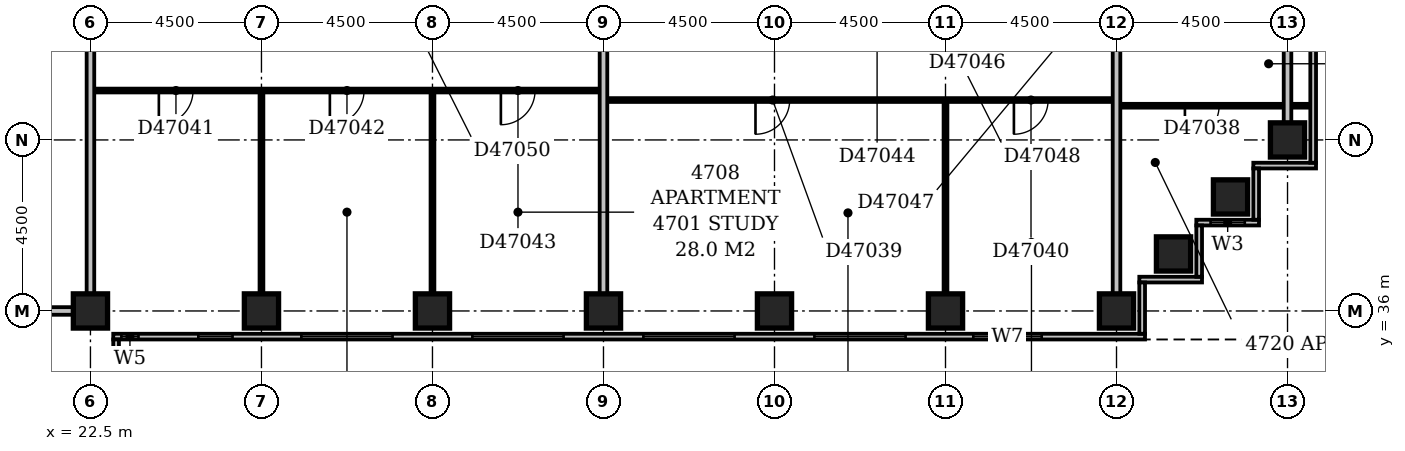
"""IFC4 building model, lengths in metres.
Left out: names, types, materials, properties, quantities, classifications, styles, units other than length and angle.
Written with IfcOpenShell. Run it as: python <this file> out.ifc"""

import sys

from ifc_helpers import new_model, si_unit, direction, frame, frame_2d, origin, origin_2d, place, context, subcontext, project, spatial, rectangle, extrude, element, fill, save


model = new_model("IFC4")
c1 = context("Model", 3, precision=1e-05, world=origin(), true_north=direction((0.0, 1.0)))
c2 = subcontext(c1, "Body", "Model", "MODEL_VIEW")
j1 = project(units=[si_unit("LENGTHUNIT", "METRE"), si_unit("PLANEANGLEUNIT", "RADIAN")], contexts=[c1])
p1 = place(None, origin())
s1 = spatial("IfcSite", under=j1, at=p1, CompositionType="ELEMENT")
p2 = place(p1, origin())
s2 = spatial("IfcBuilding", under=s1, at=p2, CompositionType="ELEMENT")
p3 = place(p2, frame((0.0, 0.0, 186.2)))
s3 = spatial("IfcBuildingStorey", under=s2, at=p3, CompositionType="ELEMENT", Elevation=186.2)
for number, where, z_axis, x_axis in (
    (1, (22.5, 36.0, -0.35), (0.0, 0.0, 1.0), (1.0, 0.0, 0.0)),
    (2, (27.0, 36.0, -0.35), (0.0, 0.0, 1.0), (1.0, 0.0, 0.0)),
    (3, (31.5, 36.0, -0.35), (0.0, 0.0, 1.0), (1.0, 0.0, 0.0)),
    (4, (36.0, 36.0, -0.35), (0.0, 0.0, 1.0), (1.0, 0.0, 0.0)),
    (5, (40.5, 36.0, -0.35), (0.0, 0.0, 1.0), (1.0, 0.0, 0.0)),
    (6, (45.0, 36.0, -0.35), (0.0, 0.0, 1.0), (1.0, 0.0, 0.0)),
    (7, (49.5, 36.0, -0.35), (0.0, 0.0, 1.0), (1.0, 0.0, 0.0)),
    (8, (51.0, 37.5, -0.35), (0.0, 0.0, 1.0), (1.0, 0.0, 0.0)),
    (9, (52.5, 39.0, -0.35), (0.0, 0.0, 1.0), (1.0, 0.0, 0.0)),
    (10, (54.0, 40.5, -0.35), (0.0, 0.0, 1.0), (1.0, 0.0, 0.0)),
):
    element("IfcColumn", number, at=place(p3, frame(where, z_axis=z_axis, x_axis=x_axis)), inside=s3, PredefinedType="COLUMN", context=c2, shape_type="SweptSolid", body=[
        extrude(rectangle(XDim=0.9, YDim=0.9, at=origin_2d()), origin(), (0.0, 0.0, 1.0), 3.65),
    ])
p4 = place(p3, frame((23.175, 17.4, 0.0), z_axis=(0.0, 0.0, 1.0), x_axis=(0.0, 1.0, 0.0)))
e11 = element("IfcWall", 11, at=p4, inside=s3, PredefinedType="STANDARD", context=c2, shape_type="SweptSolid", body=[
    extrude(rectangle(XDim=17.85, YDim=0.15, at=frame_2d((8.925, 0.0))), origin(), (0.0, 0.0, 1.0), 2.7),
])
p5 = place(p4, frame((2.937, 0.0, 0.6)))
e12 = element("IfcOpeningElement", 12, at=p5, cuts=e11, PredefinedType="OPENING", context=c2, shape_type="SweptSolid", body=[
    extrude(rectangle(XDim=1.5, YDim=1.8, at=frame_2d((0.75, 0.9))), frame((0.0, 0.087, 0.0), z_axis=(0.0, -1.0, 0.0), x_axis=(1.0, 0.0, 0.0)), (0.0, 0.0, 1.0), 0.174),
])
p6 = place(p4, frame((6.15, 0.0, 0.6)))
e13 = element("IfcOpeningElement", 13, at=p6, cuts=e11, PredefinedType="OPENING", context=c2, shape_type="SweptSolid", body=[
    extrude(rectangle(XDim=2.4, YDim=1.8, at=frame_2d((1.2, 0.9))), frame((0.0, 0.087, 0.0), z_axis=(0.0, -1.0, 0.0), x_axis=(1.0, 0.0, 0.0)), (0.0, 0.0, 1.0), 0.174),
])
p7 = place(p4, frame((10.65, 0.0, 0.6)))
e14 = element("IfcOpeningElement", 14, at=p7, cuts=e11, PredefinedType="OPENING", context=c2, shape_type="SweptSolid", body=[
    extrude(rectangle(XDim=2.4, YDim=1.8, at=frame_2d((1.2, 0.9))), frame((0.0, 0.087, 0.0), z_axis=(0.0, -1.0, 0.0), x_axis=(1.0, 0.0, 0.0)), (0.0, 0.0, 1.0), 0.174),
])
p8 = place(p4, frame((14.869, 0.0, 0.6)))
e15 = element("IfcOpeningElement", 15, at=p8, cuts=e11, PredefinedType="OPENING", context=c2, shape_type="SweptSolid", body=[
    extrude(rectangle(XDim=2.4, YDim=1.8, at=frame_2d((1.2, 0.9))), frame((0.0, 0.087, 0.0), z_axis=(0.0, -1.0, 0.0), x_axis=(1.0, 0.0, 0.0)), (0.0, 0.0, 1.0), 0.174),
])
p9 = place(p3, frame((23.1, 35.325, 0.0), z_axis=(0.0, 0.0, 1.0), x_axis=(1.0, 0.0, 0.0)))
e16 = element("IfcWall", 16, at=p9, inside=s3, PredefinedType="STANDARD", context=c2, shape_type="SweptSolid", body=[
    extrude(rectangle(XDim=27.15, YDim=0.15, at=frame_2d((13.575, 0.0))), origin(), (0.0, 0.0, 1.0), 2.7),
])
p10 = place(p9, frame((0.214, 0.0, 0.6)))
e17 = element("IfcOpeningElement", 17, at=p10, cuts=e16, PredefinedType="OPENING", context=c2, shape_type="SweptSolid", body=[
    extrude(rectangle(XDim=0.45, YDim=1.8, at=frame_2d((0.225, 0.9))), frame((0.0, 0.087, 0.0), z_axis=(0.0, -1.0, 0.0), x_axis=(1.0, 0.0, 0.0)), (0.0, 0.0, 1.0), 0.174),
])
p11 = place(p9, frame((2.239, 0.0, 0.6)))
e18 = element("IfcOpeningElement", 18, at=p11, cuts=e16, PredefinedType="OPENING", context=c2, shape_type="SweptSolid", body=[
    extrude(rectangle(XDim=0.9, YDim=1.8, at=frame_2d((0.45, 0.9))), frame((0.0, 0.087, 0.0), z_axis=(0.0, -1.0, 0.0), x_axis=(1.0, 0.0, 0.0)), (0.0, 0.0, 1.0), 0.174),
])
p12 = place(p9, frame((4.95, 0.0, 0.6)))
e19 = element("IfcOpeningElement", 19, at=p12, cuts=e16, PredefinedType="OPENING", context=c2, shape_type="SweptSolid", body=[
    extrude(rectangle(XDim=2.4, YDim=1.8, at=frame_2d((1.2, 0.9))), frame((0.0, 0.087, 0.0), z_axis=(0.0, -1.0, 0.0), x_axis=(1.0, 0.0, 0.0)), (0.0, 0.0, 1.0), 0.174),
])
p13 = place(p9, frame((9.45, 0.0, 0.6)))
e20 = element("IfcOpeningElement", 20, at=p13, cuts=e16, PredefinedType="OPENING", context=c2, shape_type="SweptSolid", body=[
    extrude(rectangle(XDim=2.4, YDim=1.8, at=frame_2d((1.2, 0.9))), frame((0.0, 0.087, 0.0), z_axis=(0.0, -1.0, 0.0), x_axis=(1.0, 0.0, 0.0)), (0.0, 0.0, 1.0), 0.174),
])
p14 = place(p9, frame((13.95, 0.0, 0.6)))
e21 = element("IfcOpeningElement", 21, at=p14, cuts=e16, PredefinedType="OPENING", context=c2, shape_type="SweptSolid", body=[
    extrude(rectangle(XDim=2.4, YDim=1.8, at=frame_2d((1.2, 0.9))), frame((0.0, 0.087, 0.0), z_axis=(0.0, -1.0, 0.0), x_axis=(1.0, 0.0, 0.0)), (0.0, 0.0, 1.0), 0.174),
])
p15 = place(p9, frame((18.45, 0.0, 0.6)))
e22 = element("IfcOpeningElement", 22, at=p15, cuts=e16, PredefinedType="OPENING", context=c2, shape_type="SweptSolid", body=[
    extrude(rectangle(XDim=2.4, YDim=1.8, at=frame_2d((1.2, 0.9))), frame((0.0, 0.087, 0.0), z_axis=(0.0, -1.0, 0.0), x_axis=(1.0, 0.0, 0.0)), (0.0, 0.0, 1.0), 0.174),
])
p16 = place(p9, frame((22.631, 0.0, 0.6)))
e23 = element("IfcOpeningElement", 23, at=p16, cuts=e16, PredefinedType="OPENING", context=c2, shape_type="SweptSolid", body=[
    extrude(rectangle(XDim=1.8, YDim=1.8, at=frame_2d((0.9, 0.9))), frame((0.0, 0.087, 0.0), z_axis=(0.0, -1.0, 0.0), x_axis=(1.0, 0.0, 0.0)), (0.0, 0.0, 1.0), 0.174),
])
p17 = place(p3, frame((50.175, 35.4, 0.0), z_axis=(0.0, 0.0, 1.0), x_axis=(0.0, 1.0, 0.0)))
e24 = element("IfcWall", 24, at=p17, inside=s3, PredefinedType="STANDARD", context=c2, shape_type="SweptSolid", body=[
    extrude(rectangle(XDim=1.35, YDim=0.15, at=frame_2d((0.675, 0.0))), origin(), (0.0, 0.0, 1.0), 2.7),
])
p18 = place(p3, frame((50.1, 36.825, 0.0), z_axis=(0.0, 0.0, 1.0), x_axis=(1.0, 0.0, 0.0)))
e25 = element("IfcWall", 25, at=p18, inside=s3, PredefinedType="STANDARD", context=c2, shape_type="SweptSolid", body=[
    extrude(rectangle(XDim=1.65, YDim=0.15, at=frame_2d((0.825, 0.0))), origin(), (0.0, 0.0, 1.0), 2.7),
])
p19 = place(p3, frame((51.675, 36.9, 0.0), z_axis=(0.0, 0.0, 1.0), x_axis=(0.0, 1.0, 0.0)))
e26 = element("IfcWall", 26, at=p19, inside=s3, PredefinedType="STANDARD", context=c2, shape_type="SweptSolid", body=[
    extrude(rectangle(XDim=1.35, YDim=0.15, at=frame_2d((0.675, 0.0))), origin(), (0.0, 0.0, 1.0), 2.7),
])
p20 = place(p3, frame((51.6, 38.325, 0.0), z_axis=(0.0, 0.0, 1.0), x_axis=(1.0, 0.0, 0.0)))
e27 = element("IfcWall", 27, at=p20, inside=s3, PredefinedType="STANDARD", context=c2, shape_type="SweptSolid", body=[
    extrude(rectangle(XDim=1.65, YDim=0.15, at=frame_2d((0.825, 0.0))), origin(), (0.0, 0.0, 1.0), 2.7),
])
p21 = place(p20, frame((0.375, 0.0, 0.5)))
e28 = element("IfcOpeningElement", 28, at=p21, cuts=e27, PredefinedType="OPENING", context=c2, shape_type="SweptSolid", body=[
    extrude(rectangle(XDim=0.9, YDim=1.8, at=frame_2d((0.45, 0.9))), frame((0.0, 0.087, 0.0), z_axis=(0.0, -1.0, 0.0), x_axis=(1.0, 0.0, 0.0)), (0.0, 0.0, 1.0), 0.174),
])
p22 = place(p3, frame((53.175, 38.4, 0.0), z_axis=(0.0, 0.0, 1.0), x_axis=(0.0, 1.0, 0.0)))
e29 = element("IfcWall", 29, at=p22, inside=s3, PredefinedType="STANDARD", context=c2, shape_type="SweptSolid", body=[
    extrude(rectangle(XDim=1.35, YDim=0.15, at=frame_2d((0.675, 0.0))), origin(), (0.0, 0.0, 1.0), 2.7),
])
p23 = place(p3, frame((53.1, 39.825, 0.0), z_axis=(0.0, 0.0, 1.0), x_axis=(1.0, 0.0, 0.0)))
e30 = element("IfcWall", 30, at=p23, inside=s3, PredefinedType="STANDARD", context=c2, shape_type="SweptSolid", body=[
    extrude(rectangle(XDim=1.65, YDim=0.15, at=frame_2d((0.825, 0.0))), origin(), (0.0, 0.0, 1.0), 2.7),
])
p24 = place(p3, frame((54.675, 39.9, 0.0), z_axis=(0.0, 0.0, 1.0), x_axis=(0.0, 1.0, 0.0)))
e31 = element("IfcWall", 31, at=p24, inside=s3, PredefinedType="STANDARD", context=c2, shape_type="SweptSolid", body=[
    extrude(rectangle(XDim=14.85, YDim=0.15, at=frame_2d((7.425, 0.0))), origin(), (0.0, 0.0, 1.0), 2.7),
])
p25 = place(p24, frame((11.25, 0.0, 0.0)))
e32 = element("IfcOpeningElement", 32, at=p25, cuts=e31, PredefinedType="OPENING", context=c2, shape_type="SweptSolid", body=[
    extrude(rectangle(XDim=1.2, YDim=2.4, at=frame_2d((0.6, 1.2))), frame((0.0, 0.087, 0.0), z_axis=(0.0, -1.0, 0.0), x_axis=(1.0, 0.0, 0.0)), (0.0, 0.0, 1.0), 0.174),
])
p26 = place(p3, frame((9.1, 36.0, 0.0), z_axis=(0.0, 0.0, 1.0), x_axis=(1.0, 0.0, 0.0)))
e33 = element("IfcWall", 33, at=p26, inside=s3, PredefinedType="PARTITIONING", context=c2, shape_type="SweptSolid", body=[
    extrude(rectangle(XDim=12.95, YDim=0.2, at=frame_2d((6.475, 0.0))), origin(), (0.0, 0.0, 1.0), 3.3),
])
p27 = place(p3, frame((22.5, 36.45, 0.0), z_axis=(0.0, 0.0, 1.0), x_axis=(0.0, 1.0, 0.0)))
e34 = element("IfcWall", 34, at=p27, inside=s3, PredefinedType="PARTITIONING", context=c2, shape_type="SweptSolid", body=[
    extrude(rectangle(XDim=13.05, YDim=0.2, at=frame_2d((6.525, 0.0))), origin(), (0.0, 0.0, 1.0), 3.3),
])
p28 = place(p3, frame((27.0, 36.45, 0.0), z_axis=(0.0, 0.0, 1.0), x_axis=(0.0, 1.0, 0.0)))
e35 = element("IfcWall", 35, at=p28, inside=s3, PredefinedType="PARTITIONING", context=c2, shape_type="SweptSolid", body=[
    extrude(rectangle(XDim=5.3, YDim=0.1, at=frame_2d((2.65, 0.0))), origin(), (0.0, 0.0, 1.0), 2.4),
])
p29 = place(p3, frame((31.5, 36.45, 0.0), z_axis=(0.0, 0.0, 1.0), x_axis=(0.0, 1.0, 0.0)))
e36 = element("IfcWall", 36, at=p29, inside=s3, PredefinedType="PARTITIONING", context=c2, shape_type="SweptSolid", body=[
    extrude(rectangle(XDim=5.3, YDim=0.1, at=frame_2d((2.65, 0.0))), origin(), (0.0, 0.0, 1.0), 3.3),
])
p30 = place(p3, frame((36.0, 36.45, 0.0), z_axis=(0.0, 0.0, 1.0), x_axis=(0.0, 1.0, 0.0)))
e37 = element("IfcWall", 37, at=p30, inside=s3, PredefinedType="PARTITIONING", context=c2, shape_type="SweptSolid", body=[
    extrude(rectangle(XDim=12.95, YDim=0.2, at=frame_2d((6.475, 0.0))), origin(), (0.0, 0.0, 1.0), 2.4),
])
p31 = place(p3, frame((45.0, 36.45, 0.0), z_axis=(0.0, 0.0, 1.0), x_axis=(0.0, 1.0, 0.0)))
e38 = element("IfcWall", 38, at=p31, inside=s3, PredefinedType="PARTITIONING", context=c2, shape_type="SweptSolid", body=[
    extrude(rectangle(XDim=5.05, YDim=0.1, at=frame_2d((2.525, 0.0))), origin(), (0.0, 0.0, 1.0), 2.6),
])
p32 = place(p3, frame((49.5, 36.45, 0.0), z_axis=(0.0, 0.0, 1.0), x_axis=(0.0, 1.0, 0.0)))
e39 = element("IfcWall", 39, at=p32, inside=s3, PredefinedType="PARTITIONING", context=c2, shape_type="SweptSolid", body=[
    extrude(rectangle(XDim=12.95, YDim=0.2, at=frame_2d((6.475, 0.0))), origin(), (0.0, 0.0, 1.0), 3.3),
])
p33 = place(p3, frame((54.0, 40.95, 0.0), z_axis=(0.0, 0.0, 1.0), x_axis=(0.0, 1.0, 0.0)))
e40 = element("IfcWall", 40, at=p33, inside=s3, PredefinedType="PARTITIONING", context=c2, shape_type="SweptSolid", body=[
    extrude(rectangle(XDim=8.1, YDim=0.2, at=frame_2d((4.05, 0.0))), origin(), (0.0, 0.0, 1.0), 2.7),
])
p34 = place(p3, frame((49.6, 41.4, 0.0), z_axis=(0.0, 0.0, 1.0), x_axis=(1.0, 0.0, 0.0)))
e41 = element("IfcWall", 41, at=p34, inside=s3, PredefinedType="PARTITIONING", context=c2, shape_type="SweptSolid", body=[
    extrude(rectangle(XDim=5.0, YDim=0.1, at=frame_2d((2.5, 0.0))), origin(), (0.0, 0.0, 1.0), 3.3),
])
p35 = place(p34, frame((1.7, 0.0, 0.0)))
e42 = element("IfcOpeningElement", 42, at=p35, cuts=e41, PredefinedType="OPENING", context=c2, shape_type="SweptSolid", body=[
    extrude(rectangle(XDim=0.9, YDim=2.1, at=frame_2d((0.45, 1.05))), frame((0.0, 0.062, 0.0), z_axis=(0.0, -1.0, 0.0), x_axis=(1.0, 0.0, 0.0)), (0.0, 0.0, 1.0), 0.124),
])
p36 = place(p3, frame((36.1, 41.55, 0.0), z_axis=(0.0, 0.0, 1.0), x_axis=(1.0, 0.0, 0.0)))
e43 = element("IfcWall", 43, at=p36, inside=s3, PredefinedType="PARTITIONING", context=c2, shape_type="SweptSolid", body=[
    extrude(rectangle(XDim=13.3, YDim=0.1, at=frame_2d((6.65, 0.0))), origin(), (0.0, 0.0, 1.0), 3.3),
])
p37 = place(p36, frame((3.9, 0.0, 0.0)))
e44 = element("IfcOpeningElement", 44, at=p37, cuts=e43, PredefinedType="OPENING", context=c2, shape_type="SweptSolid", body=[
    extrude(rectangle(XDim=0.9, YDim=2.1, at=frame_2d((0.45, 1.05))), frame((0.0, 0.062, 0.0), z_axis=(0.0, -1.0, 0.0), x_axis=(1.0, 0.0, 0.0)), (0.0, 0.0, 1.0), 0.124),
])
p38 = place(p36, frame((10.7, 0.0, 0.0)))
e45 = element("IfcOpeningElement", 45, at=p38, cuts=e43, PredefinedType="OPENING", context=c2, shape_type="SweptSolid", body=[
    extrude(rectangle(XDim=0.9, YDim=2.1, at=frame_2d((0.45, 1.05))), frame((0.0, 0.062, 0.0), z_axis=(0.0, -1.0, 0.0), x_axis=(1.0, 0.0, 0.0)), (0.0, 0.0, 1.0), 0.124),
])
p39 = place(p3, frame((22.6, 41.8, 0.0), z_axis=(0.0, 0.0, 1.0), x_axis=(1.0, 0.0, 0.0)))
e46 = element("IfcWall", 46, at=p39, inside=s3, PredefinedType="PARTITIONING", context=c2, shape_type="SweptSolid", body=[
    extrude(rectangle(XDim=13.3, YDim=0.1, at=frame_2d((6.65, 0.0))), origin(), (0.0, 0.0, 1.0), 3.3),
])
p40 = place(p39, frame((1.7, 0.0, 0.0)))
e47 = element("IfcOpeningElement", 47, at=p40, cuts=e46, PredefinedType="OPENING", context=c2, shape_type="SweptSolid", body=[
    extrude(rectangle(XDim=0.9, YDim=2.1, at=frame_2d((0.45, 1.05))), frame((0.0, 0.062, 0.0), z_axis=(0.0, -1.0, 0.0), x_axis=(1.0, 0.0, 0.0)), (0.0, 0.0, 1.0), 0.124),
])
p41 = place(p39, frame((6.2, 0.0, 0.0)))
e48 = element("IfcOpeningElement", 48, at=p41, cuts=e46, PredefinedType="OPENING", context=c2, shape_type="SweptSolid", body=[
    extrude(rectangle(XDim=0.9, YDim=2.1, at=frame_2d((0.45, 1.05))), frame((0.0, 0.062, 0.0), z_axis=(0.0, -1.0, 0.0), x_axis=(1.0, 0.0, 0.0)), (0.0, 0.0, 1.0), 0.124),
])
p42 = place(p39, frame((10.7, 0.0, 0.0)))
e49 = element("IfcOpeningElement", 49, at=p42, cuts=e46, PredefinedType="OPENING", context=c2, shape_type="SweptSolid", body=[
    extrude(rectangle(XDim=0.9, YDim=2.1, at=frame_2d((0.45, 1.05))), frame((0.0, 0.062, 0.0), z_axis=(0.0, -1.0, 0.0), x_axis=(1.0, 0.0, 0.0)), (0.0, 0.0, 1.0), 0.124),
])
p43 = place(p8, origin())
e50 = element("IfcWindow", 50, at=p43, inside=s3, PartitioningType="SINGLE_PANEL", PredefinedType="WINDOW", context=c2, shape_type="SweptSolid", body=[
    extrude(rectangle(XDim=2.4, YDim=1.8, at=frame_2d((1.2, 0.9))), frame((0.0, 0.03, 0.0), z_axis=(0.0, -1.0, 0.0), x_axis=(1.0, 0.0, 0.0)), (0.0, 0.0, 1.0), 0.06),
])
fill(e15, e50)
p44 = place(p10, origin())
e51 = element("IfcWindow", 51, at=p44, inside=s3, PartitioningType="SINGLE_PANEL", PredefinedType="WINDOW", context=c2, shape_type="SweptSolid", body=[
    extrude(rectangle(XDim=0.45, YDim=1.8, at=frame_2d((0.225, 0.9))), frame((0.0, 0.03, 0.0), z_axis=(0.0, -1.0, 0.0), x_axis=(1.0, 0.0, 0.0)), (0.0, 0.0, 1.0), 0.06),
])
fill(e17, e51)
p45 = place(p11, origin())
e52 = element("IfcWindow", 52, at=p45, inside=s3, PartitioningType="SINGLE_PANEL", PredefinedType="WINDOW", context=c2, shape_type="SweptSolid", body=[
    extrude(rectangle(XDim=0.9, YDim=1.8, at=frame_2d((0.45, 0.9))), frame((0.0, 0.03, 0.0), z_axis=(0.0, -1.0, 0.0), x_axis=(1.0, 0.0, 0.0)), (0.0, 0.0, 1.0), 0.06),
])
fill(e18, e52)
p46 = place(p12, origin())
e53 = element("IfcWindow", 53, at=p46, inside=s3, PartitioningType="SINGLE_PANEL", PredefinedType="WINDOW", context=c2, shape_type="SweptSolid", body=[
    extrude(rectangle(XDim=2.4, YDim=1.8, at=frame_2d((1.2, 0.9))), frame((0.0, 0.03, 0.0), z_axis=(0.0, -1.0, 0.0), x_axis=(1.0, 0.0, 0.0)), (0.0, 0.0, 1.0), 0.06),
])
fill(e19, e53)
p47 = place(p13, origin())
e54 = element("IfcWindow", 54, at=p47, inside=s3, PartitioningType="SINGLE_PANEL", PredefinedType="WINDOW", context=c2, shape_type="SweptSolid", body=[
    extrude(rectangle(XDim=2.4, YDim=1.8, at=frame_2d((1.2, 0.9))), frame((0.0, 0.03, 0.0), z_axis=(0.0, -1.0, 0.0), x_axis=(1.0, 0.0, 0.0)), (0.0, 0.0, 1.0), 0.06),
])
fill(e20, e54)
p48 = place(p14, origin())
e55 = element("IfcWindow", 55, at=p48, inside=s3, PartitioningType="SINGLE_PANEL", PredefinedType="WINDOW", context=c2, shape_type="SweptSolid", body=[
    extrude(rectangle(XDim=2.4, YDim=1.8, at=frame_2d((1.2, 0.9))), frame((0.0, 0.03, 0.0), z_axis=(0.0, -1.0, 0.0), x_axis=(1.0, 0.0, 0.0)), (0.0, 0.0, 1.0), 0.06),
])
fill(e21, e55)
p49 = place(p15, origin())
e56 = element("IfcWindow", 56, at=p49, inside=s3, PartitioningType="SINGLE_PANEL", PredefinedType="WINDOW", context=c2, shape_type="SweptSolid", body=[
    extrude(rectangle(XDim=2.4, YDim=1.8, at=frame_2d((1.2, 0.9))), frame((0.0, 0.03, 0.0), z_axis=(0.0, -1.0, 0.0), x_axis=(1.0, 0.0, 0.0)), (0.0, 0.0, 1.0), 0.06),
])
fill(e22, e56)
p50 = place(p16, origin())
e57 = element("IfcWindow", 57, at=p50, inside=s3, PartitioningType="SINGLE_PANEL", PredefinedType="WINDOW", context=c2, shape_type="SweptSolid", body=[
    extrude(rectangle(XDim=1.8, YDim=1.8, at=frame_2d((0.9, 0.9))), frame((0.0, 0.03, 0.0), z_axis=(0.0, -1.0, 0.0), x_axis=(1.0, 0.0, 0.0)), (0.0, 0.0, 1.0), 0.06),
])
fill(e23, e57)
p51 = place(p21, origin())
e58 = element("IfcWindow", 58, at=p51, inside=s3, PartitioningType="SINGLE_PANEL", PredefinedType="WINDOW", context=c2, shape_type="SweptSolid", body=[
    extrude(rectangle(XDim=0.9, YDim=1.8, at=frame_2d((0.45, 0.9))), frame((0.0, 0.03, 0.0), z_axis=(0.0, -1.0, 0.0), x_axis=(1.0, 0.0, 0.0)), (0.0, 0.0, 1.0), 0.06),
])
fill(e28, e58)
p52 = place(p35, frame((0.9, 0.0, 0.0), z_axis=(0.0, 0.0, 1.0), x_axis=(-1.0, 0.0, 0.0)))
e59 = element("IfcDoor", 59, at=p52, inside=s3, OperationType="SINGLE_SWING_RIGHT", PredefinedType="DOOR", context=c2, shape_type="SweptSolid", body=[
    extrude(rectangle(XDim=0.9, YDim=2.1, at=frame_2d((0.45, 1.05))), frame((0.0, 0.025, 0.0), z_axis=(0.0, -1.0, 0.0), x_axis=(1.0, 0.0, 0.0)), (0.0, 0.0, 1.0), 0.05),
])
fill(e42, e59)
p53 = place(p37, frame((0.9, 0.0, 0.0), z_axis=(0.0, 0.0, 1.0), x_axis=(-1.0, 0.0, 0.0)))
e60 = element("IfcDoor", 60, at=p53, inside=s3, OperationType="SINGLE_SWING_RIGHT", PredefinedType="DOOR", context=c2, shape_type="SweptSolid", body=[
    extrude(rectangle(XDim=0.9, YDim=2.1, at=frame_2d((0.45, 1.05))), frame((0.0, 0.025, 0.0), z_axis=(0.0, -1.0, 0.0), x_axis=(1.0, 0.0, 0.0)), (0.0, 0.0, 1.0), 0.05),
])
fill(e44, e60)
p54 = place(p38, frame((0.9, 0.0, 0.0), z_axis=(0.0, 0.0, 1.0), x_axis=(-1.0, 0.0, 0.0)))
e61 = element("IfcDoor", 61, at=p54, inside=s3, OperationType="SINGLE_SWING_RIGHT", PredefinedType="DOOR", context=c2, shape_type="SweptSolid", body=[
    extrude(rectangle(XDim=0.9, YDim=2.1, at=frame_2d((0.45, 1.05))), frame((0.0, 0.025, 0.0), z_axis=(0.0, -1.0, 0.0), x_axis=(1.0, 0.0, 0.0)), (0.0, 0.0, 1.0), 0.05),
])
fill(e45, e61)
p55 = place(p40, frame((0.9, 0.0, 0.0), z_axis=(0.0, 0.0, 1.0), x_axis=(-1.0, 0.0, 0.0)))
e62 = element("IfcDoor", 62, at=p55, inside=s3, OperationType="SINGLE_SWING_RIGHT", PredefinedType="DOOR", context=c2, shape_type="SweptSolid", body=[
    extrude(rectangle(XDim=0.9, YDim=2.1, at=frame_2d((0.45, 1.05))), frame((0.0, 0.025, 0.0), z_axis=(0.0, -1.0, 0.0), x_axis=(1.0, 0.0, 0.0)), (0.0, 0.0, 1.0), 0.05),
])
fill(e47, e62)
p56 = place(p41, frame((0.9, 0.0, 0.0), z_axis=(0.0, 0.0, 1.0), x_axis=(-1.0, 0.0, 0.0)))
e63 = element("IfcDoor", 63, at=p56, inside=s3, OperationType="SINGLE_SWING_RIGHT", PredefinedType="DOOR", context=c2, shape_type="SweptSolid", body=[
    extrude(rectangle(XDim=0.9, YDim=2.1, at=frame_2d((0.45, 1.05))), frame((0.0, 0.025, 0.0), z_axis=(0.0, -1.0, 0.0), x_axis=(1.0, 0.0, 0.0)), (0.0, 0.0, 1.0), 0.05),
])
fill(e48, e63)
p57 = place(p42, frame((0.9, 0.0, 0.0), z_axis=(0.0, 0.0, 1.0), x_axis=(-1.0, 0.0, 0.0)))
e64 = element("IfcDoor", 64, at=p57, inside=s3, OperationType="SINGLE_SWING_RIGHT", PredefinedType="DOOR", context=c2, shape_type="SweptSolid", body=[
    extrude(rectangle(XDim=0.9, YDim=2.1, at=frame_2d((0.45, 1.05))), frame((0.0, 0.025, 0.0), z_axis=(0.0, -1.0, 0.0), x_axis=(1.0, 0.0, 0.0)), (0.0, 0.0, 1.0), 0.05),
])
fill(e49, e64)
save(model, sys.argv[1])
